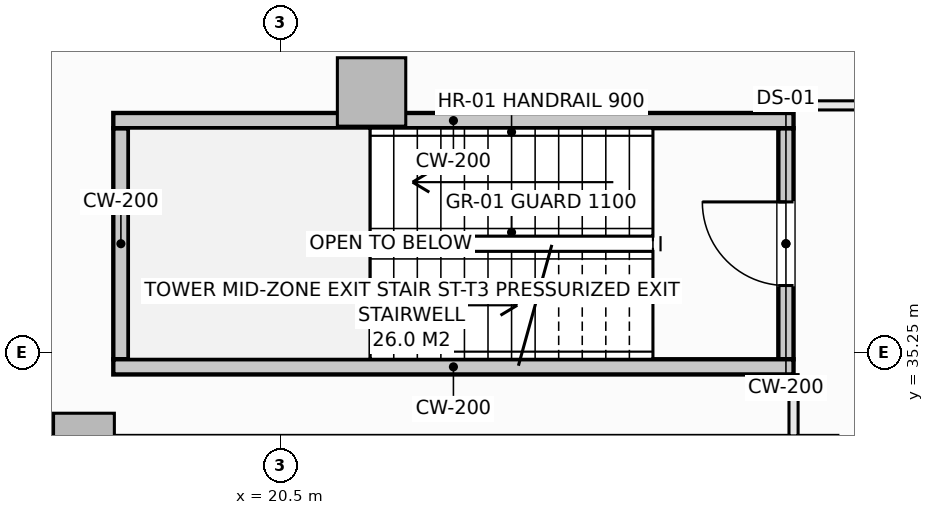
"""IFC4 building model, lengths in metres.
Left out: names, types, materials, properties, quantities, classifications, styles, units other than length and angle.
Written with IfcOpenShell. Run it as: python <this file> out.ifc"""

import sys

from ifc_helpers import new_model, si_unit, direction, frame, frame_2d, origin, origin_2d, place, context, subcontext, project, spatial, rectangle, extrude, element, fill, save


model = new_model("IFC4")
c1 = context("Model", 3, precision=1e-05, world=origin(), true_north=direction((0.0, 1.0)))
c2 = subcontext(c1, "Body", "Model", "MODEL_VIEW")
j1 = project(units=[si_unit("LENGTHUNIT", "METRE"), si_unit("PLANEANGLEUNIT", "RADIAN")], contexts=[c1])
p1 = place(None, origin())
s1 = spatial("IfcSite", under=j1, at=p1, CompositionType="ELEMENT")
p2 = place(p1, origin())
s2 = spatial("IfcBuilding", under=s1, at=p2, CompositionType="ELEMENT")
p3 = place(p2, frame((0.0, 0.0, 100.8)))
s3 = spatial("IfcBuildingStorey", under=s2, at=p3, CompositionType="ELEMENT", Elevation=100.8)
p4 = place(p3, frame((21.698, 38.677, -0.28), z_axis=(0.0, 0.0, 1.0), x_axis=(1.0, 0.0, 0.0)))
e1 = element("IfcColumn", 1, at=p4, inside=s3, PredefinedType="COLUMN", context=c2, shape_type="SweptSolid", body=[
    extrude(rectangle(XDim=0.9, YDim=0.9, at=origin_2d()), origin(), (0.0, 0.0, 1.0), 4.51),
])
p5 = place(p3, frame((17.914, 34.05, -0.28), z_axis=(0.0, 0.0, 1.0), x_axis=(1.0, 0.0, 0.0)))
e2 = element("IfcColumn", 2, at=p5, inside=s3, PredefinedType="PILASTER", context=c2, shape_type="SweptSolid", body=[
    extrude(rectangle(XDim=0.8, YDim=0.8, at=origin_2d()), origin(), (0.0, 0.0, 1.0), 4.51),
])
p6 = place(p3, frame((27.15, 35.16, -0.28), z_axis=(0.0, 0.0, 1.0), x_axis=(0.0, 1.0, 0.0)))
e3 = element("IfcWall", 3, at=p6, inside=s3, PredefinedType="SHEAR", context=c2, shape_type="SweptSolid", body=[
    extrude(rectangle(XDim=3.04, YDim=0.2, at=frame_2d((1.52, 0.0))), origin(), (0.0, 0.0, 1.0), 4.51),
])
p7 = place(p6, frame((0.97, 0.0, 0.28)))
e4 = element("IfcOpeningElement", 4, at=p7, cuts=e3, PredefinedType="OPENING", context=c2, shape_type="SweptSolid", body=[
    extrude(rectangle(XDim=1.1, YDim=2.15, at=frame_2d((0.55, 1.075))), frame((0.0, 0.11, 0.0), z_axis=(0.0, -1.0, 0.0), x_axis=(1.0, 0.0, 0.0)), (0.0, 0.0, 1.0), 0.22),
])
p8 = place(p3, frame((18.4, 35.16, -0.28), z_axis=(0.0, 0.0, 1.0), x_axis=(0.0, 1.0, 0.0)))
e5 = element("IfcWall", 5, at=p8, inside=s3, PredefinedType="SHEAR", context=c2, shape_type="SweptSolid", body=[
    extrude(rectangle(XDim=3.04, YDim=0.2, at=frame_2d((1.52, 0.0))), origin(), (0.0, 0.0, 1.0), 4.51),
])
for number, where, z_axis, x_axis in (
    (6, (18.3, 38.3, -0.28), (0.0, 0.0, 1.0), (1.0, 0.0, 0.0)),
    (7, (18.3, 35.06, -0.28), (0.0, 0.0, 1.0), (1.0, 0.0, 0.0)),
):
    element("IfcWall", number, at=place(p3, frame(where, z_axis=z_axis, x_axis=x_axis)), inside=s3, PredefinedType="SHEAR", context=c2, shape_type="SweptSolid", body=[
        extrude(rectangle(XDim=8.95, YDim=0.2, at=frame_2d((4.475, 0.0))), origin(), (0.0, 0.0, 1.0), 4.51),
    ])
p9 = place(p3, frame((27.25, 34.152, 0.0), z_axis=(0.0, 0.0, 1.0), x_axis=(0.0, 1.0, 0.0)))
e8 = element("IfcWall", 8, at=p9, inside=s3, PredefinedType="PARTITIONING", context=c2, shape_type="SweptSolid", body=[
    extrude(rectangle(XDim=0.806, YDim=0.12, at=frame_2d((0.403, 0.0))), origin(), (0.0, 0.0, 1.0), 4.23),
])
p10 = place(p3, frame((27.25, 38.5, 0.0), z_axis=(0.0, 0.0, 1.0), x_axis=(1.0, 0.0, 0.0)))
e9 = element("IfcWall", 9, at=p10, inside=s3, PredefinedType="PARTITIONING", context=c2, shape_type="SweptSolid", body=[
    extrude(rectangle(XDim=2.53, YDim=0.12, at=frame_2d((1.265, 0.0))), origin(), (0.0, 0.0, 1.0), 4.23),
])
p11 = place(p7, origin())
e10 = element("IfcDoor", 10, at=p11, inside=s3, OperationType="SINGLE_SWING_RIGHT", PredefinedType="DOOR", context=c2, shape_type="SweptSolid", body=[
    extrude(rectangle(XDim=1.1, YDim=2.15, at=frame_2d((0.55, 1.075))), frame((0.0, 0.025, 0.0), z_axis=(0.0, -1.0, 0.0), x_axis=(1.0, 0.0, 0.0)), (0.0, 0.0, 1.0), 0.05),
])
fill(e4, e10)
save(model, sys.argv[1])
